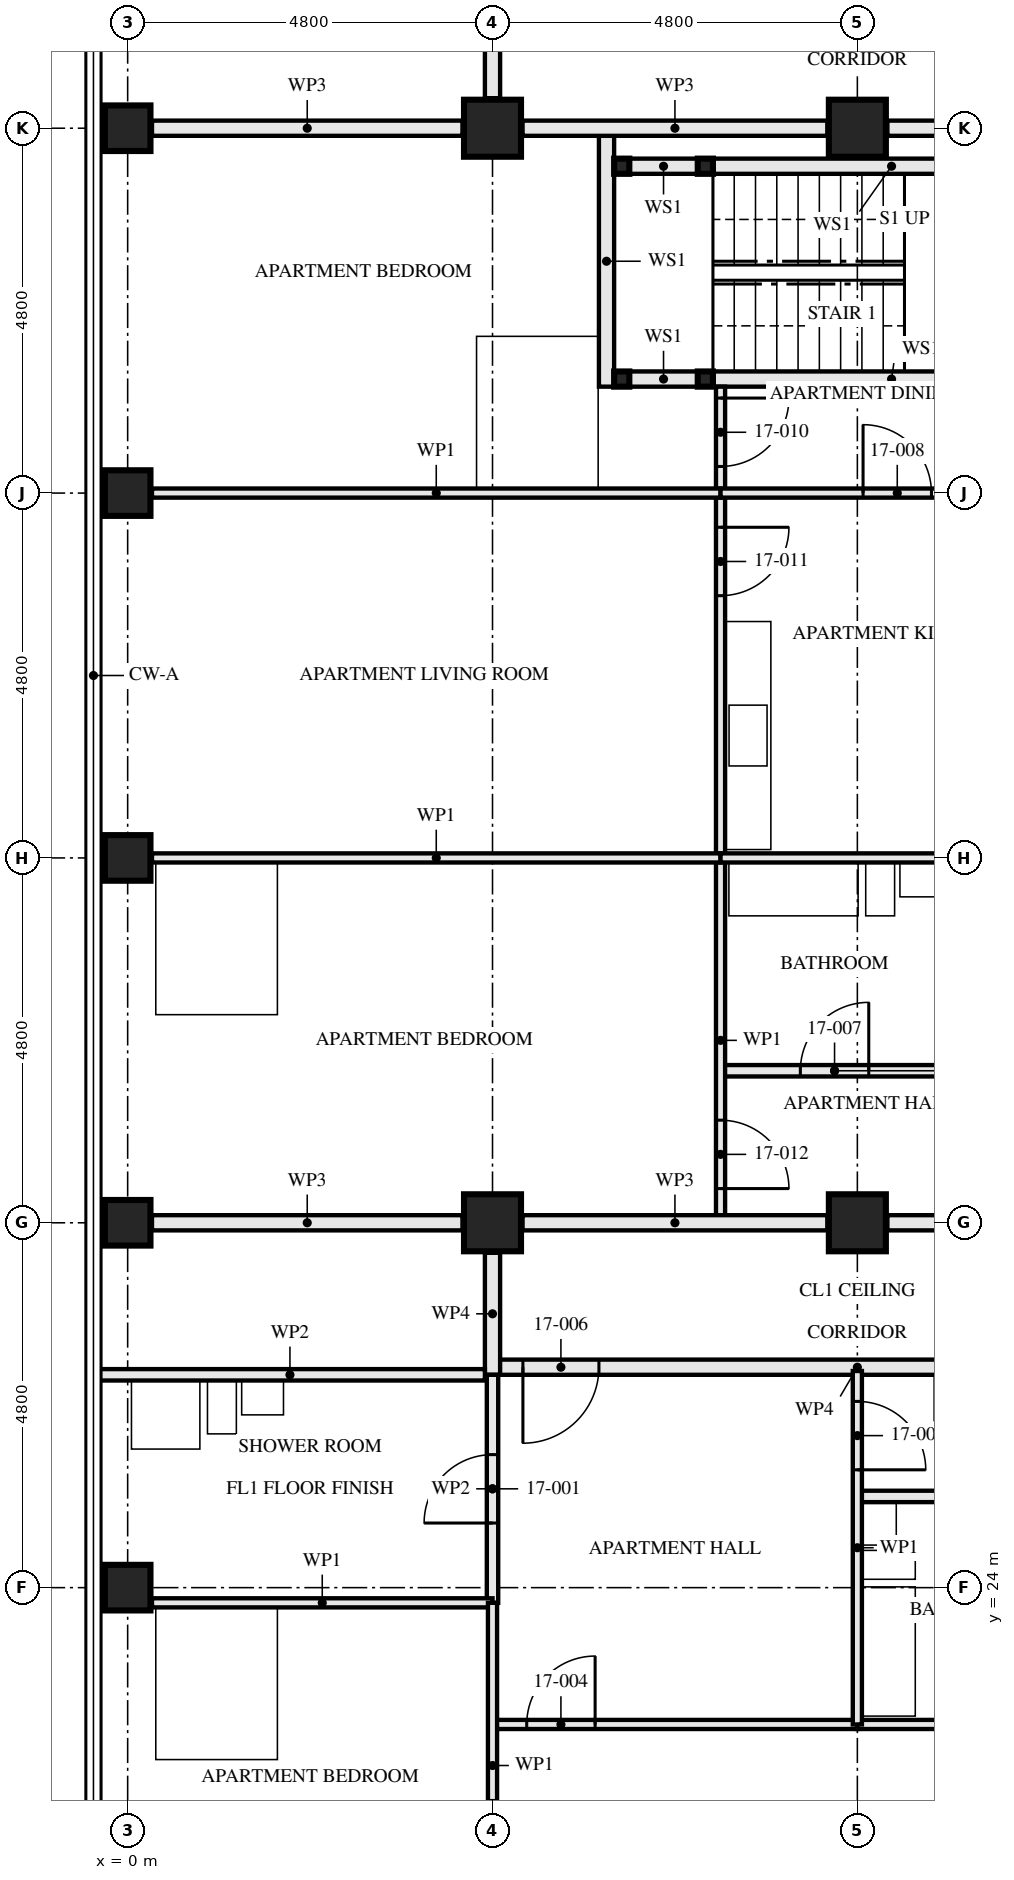
"""IFC4 building model, lengths in metres.
Left out: names, types, materials, properties, quantities, classifications, styles, units other than length and angle.
Written with IfcOpenShell. Run it as: python <this file> out.ifc"""

import sys

from ifc_helpers import new_model, si_unit, direction, frame, frame_2d, origin, origin_2d, place, context, subcontext, project, spatial, rectangle, hollow_rectangle, extrude, element, fill, save


model = new_model("IFC4")
c1 = context("Model", 3, precision=1e-05, world=origin(), true_north=direction((0.0, 1.0)))
c2 = subcontext(c1, "Body", "Model", "MODEL_VIEW")
j1 = project(units=[si_unit("LENGTHUNIT", "METRE"), si_unit("PLANEANGLEUNIT", "RADIAN")], contexts=[c1])
p1 = place(None, origin())
s1 = spatial("IfcSite", under=j1, at=p1, CompositionType="ELEMENT")
p2 = place(p1, origin())
s2 = spatial("IfcBuilding", under=s1, at=p2, CompositionType="ELEMENT")
p3 = place(p2, frame((0.0, 0.0, 65.5)))
s3 = spatial("IfcBuildingStorey", under=s2, at=p3, CompositionType="ELEMENT", Elevation=65.5)
for number, where, z_axis, x_axis in (
    (1, (0.0, 24.0, 0.0), (0.0, 0.0, 1.0), (1.0, 0.0, 0.0)),
    (2, (0.0, 28.8, 0.0), (0.0, 0.0, 1.0), (0.0, 1.0, 0.0)),
    (3, (0.0, 33.6, 0.0), (0.0, 0.0, 1.0), (1.0, 0.0, 0.0)),
    (4, (0.0, 38.4, 0.0), (0.0, 0.0, 1.0), (1.0, 0.0, 0.0)),
    (5, (0.0, 43.2, 0.0), (0.0, 0.0, 1.0), (0.0, 1.0, 0.0)),
):
    element("IfcColumn", number, at=place(p3, frame(where, z_axis=z_axis, x_axis=x_axis)), inside=s3, PredefinedType="COLUMN", context=c2, shape_type="SweptSolid", body=[
        extrude(hollow_rectangle(XDim=0.6, YDim=0.6, WallThickness=0.08, at=origin_2d()), origin(), (0.0, 0.0, 1.0), 3.5),
    ])
for number, where, z_axis, x_axis in (
    (6, (4.8, 28.8, 0.0), (0.0, 0.0, 1.0), (0.0, 1.0, 0.0)),
    (7, (4.8, 43.2, 0.0), (0.0, 0.0, 1.0), (0.0, 1.0, 0.0)),
    (8, (9.6, 28.8, 0.0), (0.0, 0.0, 1.0), (0.0, 1.0, 0.0)),
    (9, (9.6, 43.2, 0.0), (0.0, 0.0, 1.0), (0.0, 1.0, 0.0)),
):
    element("IfcColumn", number, at=place(p3, frame(where, z_axis=z_axis, x_axis=x_axis)), inside=s3, PredefinedType="COLUMN", context=c2, shape_type="SweptSolid", body=[
        extrude(hollow_rectangle(XDim=0.75, YDim=0.75, WallThickness=0.08, at=origin_2d()), origin(), (0.0, 0.0, 1.0), 3.5),
    ])
for number, where, z_axis, x_axis in (
    (10, (6.5, 42.7, 0.0), (0.0, 0.0, 1.0), (1.0, 0.0, 0.0)),
    (11, (6.5, 39.9, 0.0), (0.0, 0.0, 1.0), (1.0, 0.0, 0.0)),
    (12, (7.6, 42.7, 0.0), (0.0, 0.0, 1.0), (1.0, 0.0, 0.0)),
    (13, (7.6, 39.9, 0.0), (0.0, 0.0, 1.0), (1.0, 0.0, 0.0)),
):
    element("IfcColumn", number, at=place(p3, frame(where, z_axis=z_axis, x_axis=x_axis)), inside=s3, PredefinedType="COLUMN", context=c2, shape_type="SweptSolid", body=[
        extrude(hollow_rectangle(XDim=0.2, YDim=0.2, WallThickness=0.008, at=origin_2d()), origin(), (0.0, 0.0, 1.0), 3.33),
    ])
p4 = place(p3, frame((4.8, 23.8, 0.0), z_axis=(0.0, 0.0, 1.0), x_axis=(0.0, 1.0, 0.0)))
e14 = element("IfcWall", 14, at=p4, inside=s3, PredefinedType="PARTITIONING", context=c2, shape_type="SweptSolid", body=[
    extrude(rectangle(XDim=3.0, YDim=0.15, at=frame_2d((1.5, 0.0))), origin(), (0.0, 0.0, 1.0), 2.55),
])
p5 = place(p4, frame((1.05, 0.0, 0.0)))
e15 = element("IfcOpeningElement", 15, at=p5, cuts=e14, PredefinedType="OPENING", context=c2, shape_type="SweptSolid", body=[
    extrude(rectangle(XDim=0.9, YDim=2.1, at=frame_2d((0.45, 1.05))), frame((0.0, 0.085, 0.0), z_axis=(0.0, -1.0, 0.0), x_axis=(1.0, 0.0, 0.0)), (0.0, 0.0, 1.0), 0.171),
])
p6 = place(p3, frame((9.6, 25.2, 0.0), z_axis=(0.0, 0.0, 1.0), x_axis=(1.0, 0.0, 0.0)))
e16 = element("IfcWall", 16, at=p6, inside=s3, PredefinedType="PARTITIONING", context=c2, shape_type="SweptSolid", body=[
    extrude(rectangle(XDim=2.8, YDim=0.15, at=frame_2d((1.4, 0.0))), origin(), (0.0, 0.0, 1.0), 3.33),
])
p7 = place(p3, frame((9.6, 22.2, 0.0), z_axis=(0.0, 0.0, 1.0), x_axis=(0.0, 1.0, 0.0)))
e17 = element("IfcWall", 17, at=p7, inside=s3, PredefinedType="PARTITIONING", context=c2, shape_type="SweptSolid", body=[
    extrude(rectangle(XDim=4.65, YDim=0.12, at=frame_2d((2.325, 0.0))), origin(), (0.0, 0.0, 1.0), 2.55),
])
p8 = place(p7, frame((3.35, 0.0, 0.0)))
e18 = element("IfcOpeningElement", 18, at=p8, cuts=e17, PredefinedType="OPENING", context=c2, shape_type="SweptSolid", body=[
    extrude(rectangle(XDim=0.9, YDim=2.1, at=frame_2d((0.45, 1.05))), frame((0.0, 0.071, 0.0), z_axis=(0.0, -1.0, 0.0), x_axis=(1.0, 0.0, 0.0)), (0.0, 0.0, 1.0), 0.141),
])
p9 = place(p3, frame((0.32, 23.8, 0.0), z_axis=(0.0, 0.0, 1.0), x_axis=(1.0, 0.0, 0.0)))
e19 = element("IfcWall", 19, at=p9, inside=s3, PredefinedType="PARTITIONING", context=c2, shape_type="SweptSolid", body=[
    extrude(rectangle(XDim=4.48, YDim=0.12, at=frame_2d((2.24, 0.0))), origin(), (0.0, 0.0, 1.0), 3.33),
])
p10 = place(p3, frame((4.8, 22.2, 0.0), z_axis=(0.0, 0.0, 1.0), x_axis=(1.0, 0.0, 0.0)))
e20 = element("IfcWall", 20, at=p10, inside=s3, PredefinedType="PARTITIONING", context=c2, shape_type="SweptSolid", body=[
    extrude(rectangle(XDim=4.8, YDim=0.12, at=frame_2d((2.4, 0.0))), origin(), (0.0, 0.0, 1.0), 3.33),
])
p11 = place(p10, frame((0.45, 0.0, 0.0)))
e21 = element("IfcOpeningElement", 21, at=p11, cuts=e20, PredefinedType="OPENING", context=c2, shape_type="SweptSolid", body=[
    extrude(rectangle(XDim=0.9, YDim=2.1, at=frame_2d((0.45, 1.05))), frame((0.0, 0.071, 0.0), z_axis=(0.0, -1.0, 0.0), x_axis=(1.0, 0.0, 0.0)), (0.0, 0.0, 1.0), 0.141),
])
p12 = place(p3, frame((9.6, 22.2, 0.0), z_axis=(0.0, 0.0, 1.0), x_axis=(1.0, 0.0, 0.0)))
e22 = element("IfcWall", 22, at=p12, inside=s3, PredefinedType="PARTITIONING", context=c2, shape_type="SweptSolid", body=[
    extrude(rectangle(XDim=4.8, YDim=0.12, at=frame_2d((2.4, 0.0))), origin(), (0.0, 0.0, 1.0), 3.33),
])
p13 = place(p3, frame((4.8, 19.52, 0.0), z_axis=(0.0, 0.0, 1.0), x_axis=(0.0, 1.0, 0.0)))
e23 = element("IfcWall", 23, at=p13, inside=s3, PredefinedType="PARTITIONING", context=c2, shape_type="SweptSolid", body=[
    extrude(rectangle(XDim=4.28, YDim=0.12, at=frame_2d((2.14, 0.0))), origin(), (0.0, 0.0, 1.0), 3.33),
])
p14 = place(p13, frame((0.78, 0.0, 0.0)))
e24 = element("IfcOpeningElement", 24, at=p14, cuts=e23, PredefinedType="OPENING", context=c2, shape_type="SweptSolid", body=[
    extrude(rectangle(XDim=0.9, YDim=2.1, at=frame_2d((0.45, 1.05))), frame((0.0, 0.071, 0.0), z_axis=(0.0, -1.0, 0.0), x_axis=(1.0, 0.0, 0.0)), (0.0, 0.0, 1.0), 0.141),
])
p15 = place(p3, frame((4.8, 26.9, 0.0), z_axis=(0.0, 0.0, 1.0), x_axis=(1.0, 0.0, 0.0)))
e25 = element("IfcWall", 25, at=p15, inside=s3, PredefinedType="PARTITIONING", context=c2, shape_type="SweptSolid", body=[
    extrude(rectangle(XDim=9.6, YDim=0.2, at=frame_2d((4.8, 0.0))), origin(), (0.0, 0.0, 1.0), 3.33),
])
p16 = place(p15, frame((0.4, 0.0, 0.0)))
e26 = element("IfcOpeningElement", 26, at=p16, cuts=e25, PredefinedType="OPENING", context=c2, shape_type="SweptSolid", body=[
    extrude(rectangle(XDim=1.0, YDim=2.1, at=frame_2d((0.5, 1.05))), frame((0.0, 0.111, 0.0), z_axis=(0.0, -1.0, 0.0), x_axis=(1.0, 0.0, 0.0)), (0.0, 0.0, 1.0), 0.221),
])
p17 = place(p3, frame((4.8, 26.8, 0.0), z_axis=(0.0, 0.0, 1.0), x_axis=(0.0, 1.0, 0.0)))
e27 = element("IfcWall", 27, at=p17, inside=s3, PredefinedType="PARTITIONING", context=c2, shape_type="SweptSolid", body=[
    extrude(rectangle(XDim=1.605, YDim=0.2, at=frame_2d((0.802, 0.0))), origin(), (0.0, 0.0, 1.0), 3.33),
])
p18 = place(p3, frame((6.6, 42.7, 0.0), z_axis=(0.0, 0.0, 1.0), x_axis=(1.0, 0.0, 0.0)))
e28 = element("IfcWall", 28, at=p18, inside=s3, PredefinedType="SOLIDWALL", context=c2, shape_type="SweptSolid", body=[
    extrude(rectangle(XDim=0.9, YDim=0.2, at=frame_2d((0.45, 0.0))), origin(), (0.0, 0.0, 1.0), 2.99),
])
p19 = place(p3, frame((7.7, 42.7, 0.0), z_axis=(0.0, 0.0, 1.0), x_axis=(1.0, 0.0, 0.0)))
e29 = element("IfcWall", 29, at=p19, inside=s3, PredefinedType="SOLIDWALL", context=c2, shape_type="SweptSolid", body=[
    extrude(rectangle(XDim=4.7, YDim=0.2, at=frame_2d((2.35, 0.0))), origin(), (0.0, 0.0, 1.0), 2.99),
])
p20 = place(p3, frame((6.6, 39.9, 0.0), z_axis=(0.0, 0.0, 1.0), x_axis=(1.0, 0.0, 0.0)))
e30 = element("IfcWall", 30, at=p20, inside=s3, PredefinedType="SOLIDWALL", context=c2, shape_type="SweptSolid", body=[
    extrude(rectangle(XDim=0.9, YDim=0.2, at=frame_2d((0.45, 0.0))), origin(), (0.0, 0.0, 1.0), 2.99),
])
p21 = place(p3, frame((7.7, 39.9, 0.0), z_axis=(0.0, 0.0, 1.0), x_axis=(1.0, 0.0, 0.0)))
e31 = element("IfcWall", 31, at=p21, inside=s3, PredefinedType="SOLIDWALL", context=c2, shape_type="SweptSolid", body=[
    extrude(rectangle(XDim=4.7, YDim=0.2, at=frame_2d((2.35, 0.0))), origin(), (0.0, 0.0, 1.0), 2.99),
])
p22 = place(p3, frame((6.3, 43.1, 0.0), z_axis=(0.0, 0.0, 1.0), x_axis=(0.0, -1.0, 0.0)))
e32 = element("IfcWall", 32, at=p22, inside=s3, PredefinedType="SOLIDWALL", context=c2, shape_type="SweptSolid", body=[
    extrude(rectangle(XDim=3.3, YDim=0.2, at=frame_2d((1.65, 0.0))), origin(), (0.0, 0.0, 1.0), 3.33),
])
p23 = place(p3, frame((7.8, 30.8, 0.0), z_axis=(0.0, 0.0, 1.0), x_axis=(1.0, 0.0, 0.0)))
e33 = element("IfcWall", 33, at=p23, inside=s3, PredefinedType="PARTITIONING", context=c2, shape_type="SweptSolid", body=[
    extrude(rectangle(XDim=3.0, YDim=0.15, at=frame_2d((1.5, 0.0))), origin(), (0.0, 0.0, 1.0), 3.33),
])
p24 = place(p23, frame((1.05, 0.0, 0.0)))
e34 = element("IfcOpeningElement", 34, at=p24, cuts=e33, PredefinedType="OPENING", context=c2, shape_type="SweptSolid", body=[
    extrude(rectangle(XDim=0.9, YDim=2.1, at=frame_2d((0.45, 1.05))), frame((0.0, 0.085, 0.0), z_axis=(0.0, -1.0, 0.0), x_axis=(1.0, 0.0, 0.0)), (0.0, 0.0, 1.0), 0.171),
])
p25 = place(p3, frame((7.8, 38.4, 0.0), z_axis=(0.0, 0.0, 1.0), x_axis=(1.0, 0.0, 0.0)))
e35 = element("IfcWall", 35, at=p25, inside=s3, PredefinedType="PARTITIONING", context=c2, shape_type="SweptSolid", body=[
    extrude(rectangle(XDim=4.65, YDim=0.12, at=frame_2d((2.325, 0.0))), origin(), (0.0, 0.0, 1.0), 2.55),
])
p26 = place(p25, frame((1.875, 0.0, 0.0)))
e36 = element("IfcOpeningElement", 36, at=p26, cuts=e35, PredefinedType="OPENING", context=c2, shape_type="SweptSolid", body=[
    extrude(rectangle(XDim=0.9, YDim=2.1, at=frame_2d((0.45, 1.05))), frame((0.0, 0.071, 0.0), z_axis=(0.0, -1.0, 0.0), x_axis=(1.0, 0.0, 0.0)), (0.0, 0.0, 1.0), 0.141),
])
p27 = place(p3, frame((7.8, 33.6, 0.0), z_axis=(0.0, 0.0, 1.0), x_axis=(1.0, 0.0, 0.0)))
e37 = element("IfcWall", 37, at=p27, inside=s3, PredefinedType="PARTITIONING", context=c2, shape_type="SweptSolid", body=[
    extrude(rectangle(XDim=4.65, YDim=0.12, at=frame_2d((2.325, 0.0))), origin(), (0.0, 0.0, 1.0), 2.55),
])
p28 = place(p27, frame((3.35, 0.0, 0.0)))
e38 = element("IfcOpeningElement", 38, at=p28, cuts=e37, PredefinedType="OPENING", context=c2, shape_type="SweptSolid", body=[
    extrude(rectangle(XDim=0.9, YDim=2.1, at=frame_2d((0.45, 1.05))), frame((0.0, 0.071, 0.0), z_axis=(0.0, -1.0, 0.0), x_axis=(1.0, 0.0, 0.0)), (0.0, 0.0, 1.0), 0.141),
])
p29 = place(p3, frame((7.8, 39.8, 0.0), z_axis=(0.0, 0.0, 1.0), x_axis=(0.0, -1.0, 0.0)))
e39 = element("IfcWall", 39, at=p29, inside=s3, PredefinedType="PARTITIONING", context=c2, shape_type="SweptSolid", body=[
    extrude(rectangle(XDim=1.4, YDim=0.12, at=frame_2d((0.7, 0.0))), origin(), (0.0, 0.0, 1.0), 3.33),
])
p30 = place(p29, frame((0.15, 0.0, 0.0)))
e40 = element("IfcOpeningElement", 40, at=p30, cuts=e39, PredefinedType="OPENING", context=c2, shape_type="SweptSolid", body=[
    extrude(rectangle(XDim=0.9, YDim=2.1, at=frame_2d((0.45, 1.05))), frame((0.0, 0.071, 0.0), z_axis=(0.0, -1.0, 0.0), x_axis=(1.0, 0.0, 0.0)), (0.0, 0.0, 1.0), 0.141),
])
p31 = place(p3, frame((7.8, 38.4, 0.0), z_axis=(0.0, 0.0, 1.0), x_axis=(0.0, -1.0, 0.0)))
e41 = element("IfcWall", 41, at=p31, inside=s3, PredefinedType="PARTITIONING", context=c2, shape_type="SweptSolid", body=[
    extrude(rectangle(XDim=4.8, YDim=0.12, at=frame_2d((2.4, 0.0))), origin(), (0.0, 0.0, 1.0), 3.33),
])
p32 = place(p31, frame((0.45, 0.0, 0.0)))
e42 = element("IfcOpeningElement", 42, at=p32, cuts=e41, PredefinedType="OPENING", context=c2, shape_type="SweptSolid", body=[
    extrude(rectangle(XDim=0.9, YDim=2.1, at=frame_2d((0.45, 1.05))), frame((0.0, 0.071, 0.0), z_axis=(0.0, -1.0, 0.0), x_axis=(1.0, 0.0, 0.0)), (0.0, 0.0, 1.0), 0.141),
])
p33 = place(p3, frame((7.8, 33.6, 0.0), z_axis=(0.0, 0.0, 1.0), x_axis=(0.0, -1.0, 0.0)))
e43 = element("IfcWall", 43, at=p33, inside=s3, PredefinedType="PARTITIONING", context=c2, shape_type="SweptSolid", body=[
    extrude(rectangle(XDim=4.8, YDim=0.12, at=frame_2d((2.4, 0.0))), origin(), (0.0, 0.0, 1.0), 3.33),
])
p34 = place(p33, frame((3.45, 0.0, 0.0)))
e44 = element("IfcOpeningElement", 44, at=p34, cuts=e43, PredefinedType="OPENING", context=c2, shape_type="SweptSolid", body=[
    extrude(rectangle(XDim=0.9, YDim=2.1, at=frame_2d((0.45, 1.05))), frame((0.0, 0.071, 0.0), z_axis=(0.0, -1.0, 0.0), x_axis=(1.0, 0.0, 0.0)), (0.0, 0.0, 1.0), 0.141),
])
for number, where, z_axis, x_axis in (
    (45, (0.32, 38.4, 0.0), (0.0, 0.0, 1.0), (1.0, 0.0, 0.0)),
    (46, (0.32, 33.6, 0.0), (0.0, 0.0, 1.0), (1.0, 0.0, 0.0)),
):
    element("IfcWall", number, at=place(p3, frame(where, z_axis=z_axis, x_axis=x_axis)), inside=s3, PredefinedType="PARTITIONING", context=c2, shape_type="SweptSolid", body=[
        extrude(rectangle(XDim=7.48, YDim=0.12, at=frame_2d((3.74, 0.0))), origin(), (0.0, 0.0, 1.0), 2.55),
    ])
p35 = place(p3, frame((4.8, 45.2, 0.0), z_axis=(0.0, 0.0, 1.0), x_axis=(0.0, -1.0, 0.0)))
e47 = element("IfcWall", 47, at=p35, inside=s3, PredefinedType="PARTITIONING", context=c2, shape_type="SweptSolid", body=[
    extrude(rectangle(XDim=1.605, YDim=0.2, at=frame_2d((0.802, 0.0))), origin(), (0.0, 0.0, 1.0), 3.33),
])
p36 = place(p3, frame((12.5, 28.8, 0.0), z_axis=(0.0, 0.0, 1.0), x_axis=(-1.0, 0.0, 0.0)))
e48 = element("IfcWall", 48, at=p36, inside=s3, PredefinedType="PARTITIONING", context=c2, shape_type="SweptSolid", body=[
    extrude(rectangle(XDim=2.505, YDim=0.2, at=frame_2d((1.252, 0.0))), origin(), (0.0, 0.0, 1.0), 2.32),
])
p37 = place(p3, frame((9.205, 28.8, 0.0), z_axis=(0.0, 0.0, 1.0), x_axis=(-1.0, 0.0, 0.0)))
e49 = element("IfcWall", 49, at=p37, inside=s3, PredefinedType="PARTITIONING", context=c2, shape_type="SweptSolid", body=[
    extrude(rectangle(XDim=4.01, YDim=0.2, at=frame_2d((2.005, 0.0))), origin(), (0.0, 0.0, 1.0), 2.32),
])
p38 = place(p3, frame((4.405, 28.8, 0.0), z_axis=(0.0, 0.0, 1.0), x_axis=(-1.0, 0.0, 0.0)))
e50 = element("IfcWall", 50, at=p38, inside=s3, PredefinedType="PARTITIONING", context=c2, shape_type="SweptSolid", body=[
    extrude(rectangle(XDim=4.085, YDim=0.2, at=frame_2d((2.042, 0.0))), origin(), (0.0, 0.0, 1.0), 2.32),
])
p39 = place(p3, frame((12.5, 43.2, 0.0), z_axis=(0.0, 0.0, 1.0), x_axis=(-1.0, 0.0, 0.0)))
e51 = element("IfcWall", 51, at=p39, inside=s3, PredefinedType="PARTITIONING", context=c2, shape_type="SweptSolid", body=[
    extrude(rectangle(XDim=2.505, YDim=0.2, at=frame_2d((1.252, 0.0))), origin(), (0.0, 0.0, 1.0), 2.32),
])
p40 = place(p3, frame((9.205, 43.2, 0.0), z_axis=(0.0, 0.0, 1.0), x_axis=(-1.0, 0.0, 0.0)))
e52 = element("IfcWall", 52, at=p40, inside=s3, PredefinedType="PARTITIONING", context=c2, shape_type="SweptSolid", body=[
    extrude(rectangle(XDim=4.01, YDim=0.2, at=frame_2d((2.005, 0.0))), origin(), (0.0, 0.0, 1.0), 2.32),
])
p41 = place(p3, frame((4.405, 43.2, 0.0), z_axis=(0.0, 0.0, 1.0), x_axis=(-1.0, 0.0, 0.0)))
e53 = element("IfcWall", 53, at=p41, inside=s3, PredefinedType="PARTITIONING", context=c2, shape_type="SweptSolid", body=[
    extrude(rectangle(XDim=4.085, YDim=0.2, at=frame_2d((2.042, 0.0))), origin(), (0.0, 0.0, 1.0), 2.32),
])
p42 = place(p3, frame((-0.43, 26.8, 0.0), z_axis=(0.0, 0.0, 1.0), x_axis=(1.0, 0.0, 0.0)))
e54 = element("IfcWall", 54, at=p42, inside=s3, PredefinedType="PARTITIONING", context=c2, shape_type="SweptSolid", body=[
    extrude(rectangle(XDim=5.13, YDim=0.15, at=frame_2d((2.565, 0.0))), origin(), (0.0, 0.0, 1.0), 2.32),
])
p43 = place(p5, origin())
e55 = element("IfcDoor", 55, at=p43, inside=s3, OperationType="SINGLE_SWING_RIGHT", PredefinedType="DOOR", context=c2, shape_type="SweptSolid", body=[
    extrude(rectangle(XDim=0.9, YDim=2.1, at=frame_2d((0.45, 1.05))), frame((0.0, 0.022, 0.0), z_axis=(0.0, -1.0, 0.0), x_axis=(1.0, 0.0, 0.0)), (0.0, 0.0, 1.0), 0.044),
])
fill(e15, e55)
p44 = place(p8, frame((0.9, 0.0, 0.0), z_axis=(0.0, 0.0, 1.0), x_axis=(-1.0, 0.0, 0.0)))
e56 = element("IfcDoor", 56, at=p44, inside=s3, OperationType="SINGLE_SWING_LEFT", PredefinedType="DOOR", context=c2, shape_type="SweptSolid", body=[
    extrude(rectangle(XDim=0.9, YDim=2.1, at=frame_2d((0.45, 1.05))), frame((0.0, 0.022, 0.0), z_axis=(0.0, -1.0, 0.0), x_axis=(1.0, 0.0, 0.0)), (0.0, 0.0, 1.0), 0.044),
])
fill(e18, e56)
p45 = place(p11, origin())
e57 = element("IfcDoor", 57, at=p45, inside=s3, OperationType="SINGLE_SWING_LEFT", PredefinedType="DOOR", context=c2, shape_type="SweptSolid", body=[
    extrude(rectangle(XDim=0.9, YDim=2.1, at=frame_2d((0.45, 1.05))), frame((0.0, 0.022, 0.0), z_axis=(0.0, -1.0, 0.0), x_axis=(1.0, 0.0, 0.0)), (0.0, 0.0, 1.0), 0.044),
])
fill(e21, e57)
p46 = place(p16, frame((1.0, 0.0, 0.0), z_axis=(0.0, 0.0, 1.0), x_axis=(-1.0, 0.0, 0.0)))
e58 = element("IfcDoor", 58, at=p46, inside=s3, OperationType="SINGLE_SWING_LEFT", PredefinedType="DOOR", context=c2, shape_type="SweptSolid", body=[
    extrude(rectangle(XDim=1.0, YDim=2.1, at=frame_2d((0.5, 1.05))), frame((0.0, 0.027, 0.0), z_axis=(0.0, -1.0, 0.0), x_axis=(1.0, 0.0, 0.0)), (0.0, 0.0, 1.0), 0.054),
])
fill(e26, e58)
p47 = place(p24, origin())
e59 = element("IfcDoor", 59, at=p47, inside=s3, OperationType="SINGLE_SWING_LEFT", PredefinedType="DOOR", context=c2, shape_type="SweptSolid", body=[
    extrude(rectangle(XDim=0.9, YDim=2.1, at=frame_2d((0.45, 1.05))), frame((0.0, 0.022, 0.0), z_axis=(0.0, -1.0, 0.0), x_axis=(1.0, 0.0, 0.0)), (0.0, 0.0, 1.0), 0.044),
])
fill(e34, e59)
p48 = place(p26, origin())
e60 = element("IfcDoor", 60, at=p48, inside=s3, OperationType="SINGLE_SWING_RIGHT", PredefinedType="DOOR", context=c2, shape_type="SweptSolid", body=[
    extrude(rectangle(XDim=0.9, YDim=2.1, at=frame_2d((0.45, 1.05))), frame((0.0, 0.022, 0.0), z_axis=(0.0, -1.0, 0.0), x_axis=(1.0, 0.0, 0.0)), (0.0, 0.0, 1.0), 0.044),
])
fill(e36, e60)
p49 = place(p30, origin())
e61 = element("IfcDoor", 61, at=p49, inside=s3, OperationType="SINGLE_SWING_RIGHT", PredefinedType="DOOR", context=c2, shape_type="SweptSolid", body=[
    extrude(rectangle(XDim=0.9, YDim=2.1, at=frame_2d((0.45, 1.05))), frame((0.0, 0.022, 0.0), z_axis=(0.0, -1.0, 0.0), x_axis=(1.0, 0.0, 0.0)), (0.0, 0.0, 1.0), 0.044),
])
fill(e40, e61)
p50 = place(p32, origin())
e62 = element("IfcDoor", 62, at=p50, inside=s3, OperationType="SINGLE_SWING_RIGHT", PredefinedType="DOOR", context=c2, shape_type="SweptSolid", body=[
    extrude(rectangle(XDim=0.9, YDim=2.1, at=frame_2d((0.45, 1.05))), frame((0.0, 0.022, 0.0), z_axis=(0.0, -1.0, 0.0), x_axis=(1.0, 0.0, 0.0)), (0.0, 0.0, 1.0), 0.044),
])
fill(e42, e62)
p51 = place(p34, origin())
e63 = element("IfcDoor", 63, at=p51, inside=s3, OperationType="SINGLE_SWING_LEFT", PredefinedType="DOOR", context=c2, shape_type="SweptSolid", body=[
    extrude(rectangle(XDim=0.9, YDim=2.1, at=frame_2d((0.45, 1.05))), frame((0.0, 0.022, 0.0), z_axis=(0.0, -1.0, 0.0), x_axis=(1.0, 0.0, 0.0)), (0.0, 0.0, 1.0), 0.044),
])
fill(e44, e63)
save(model, sys.argv[1])
